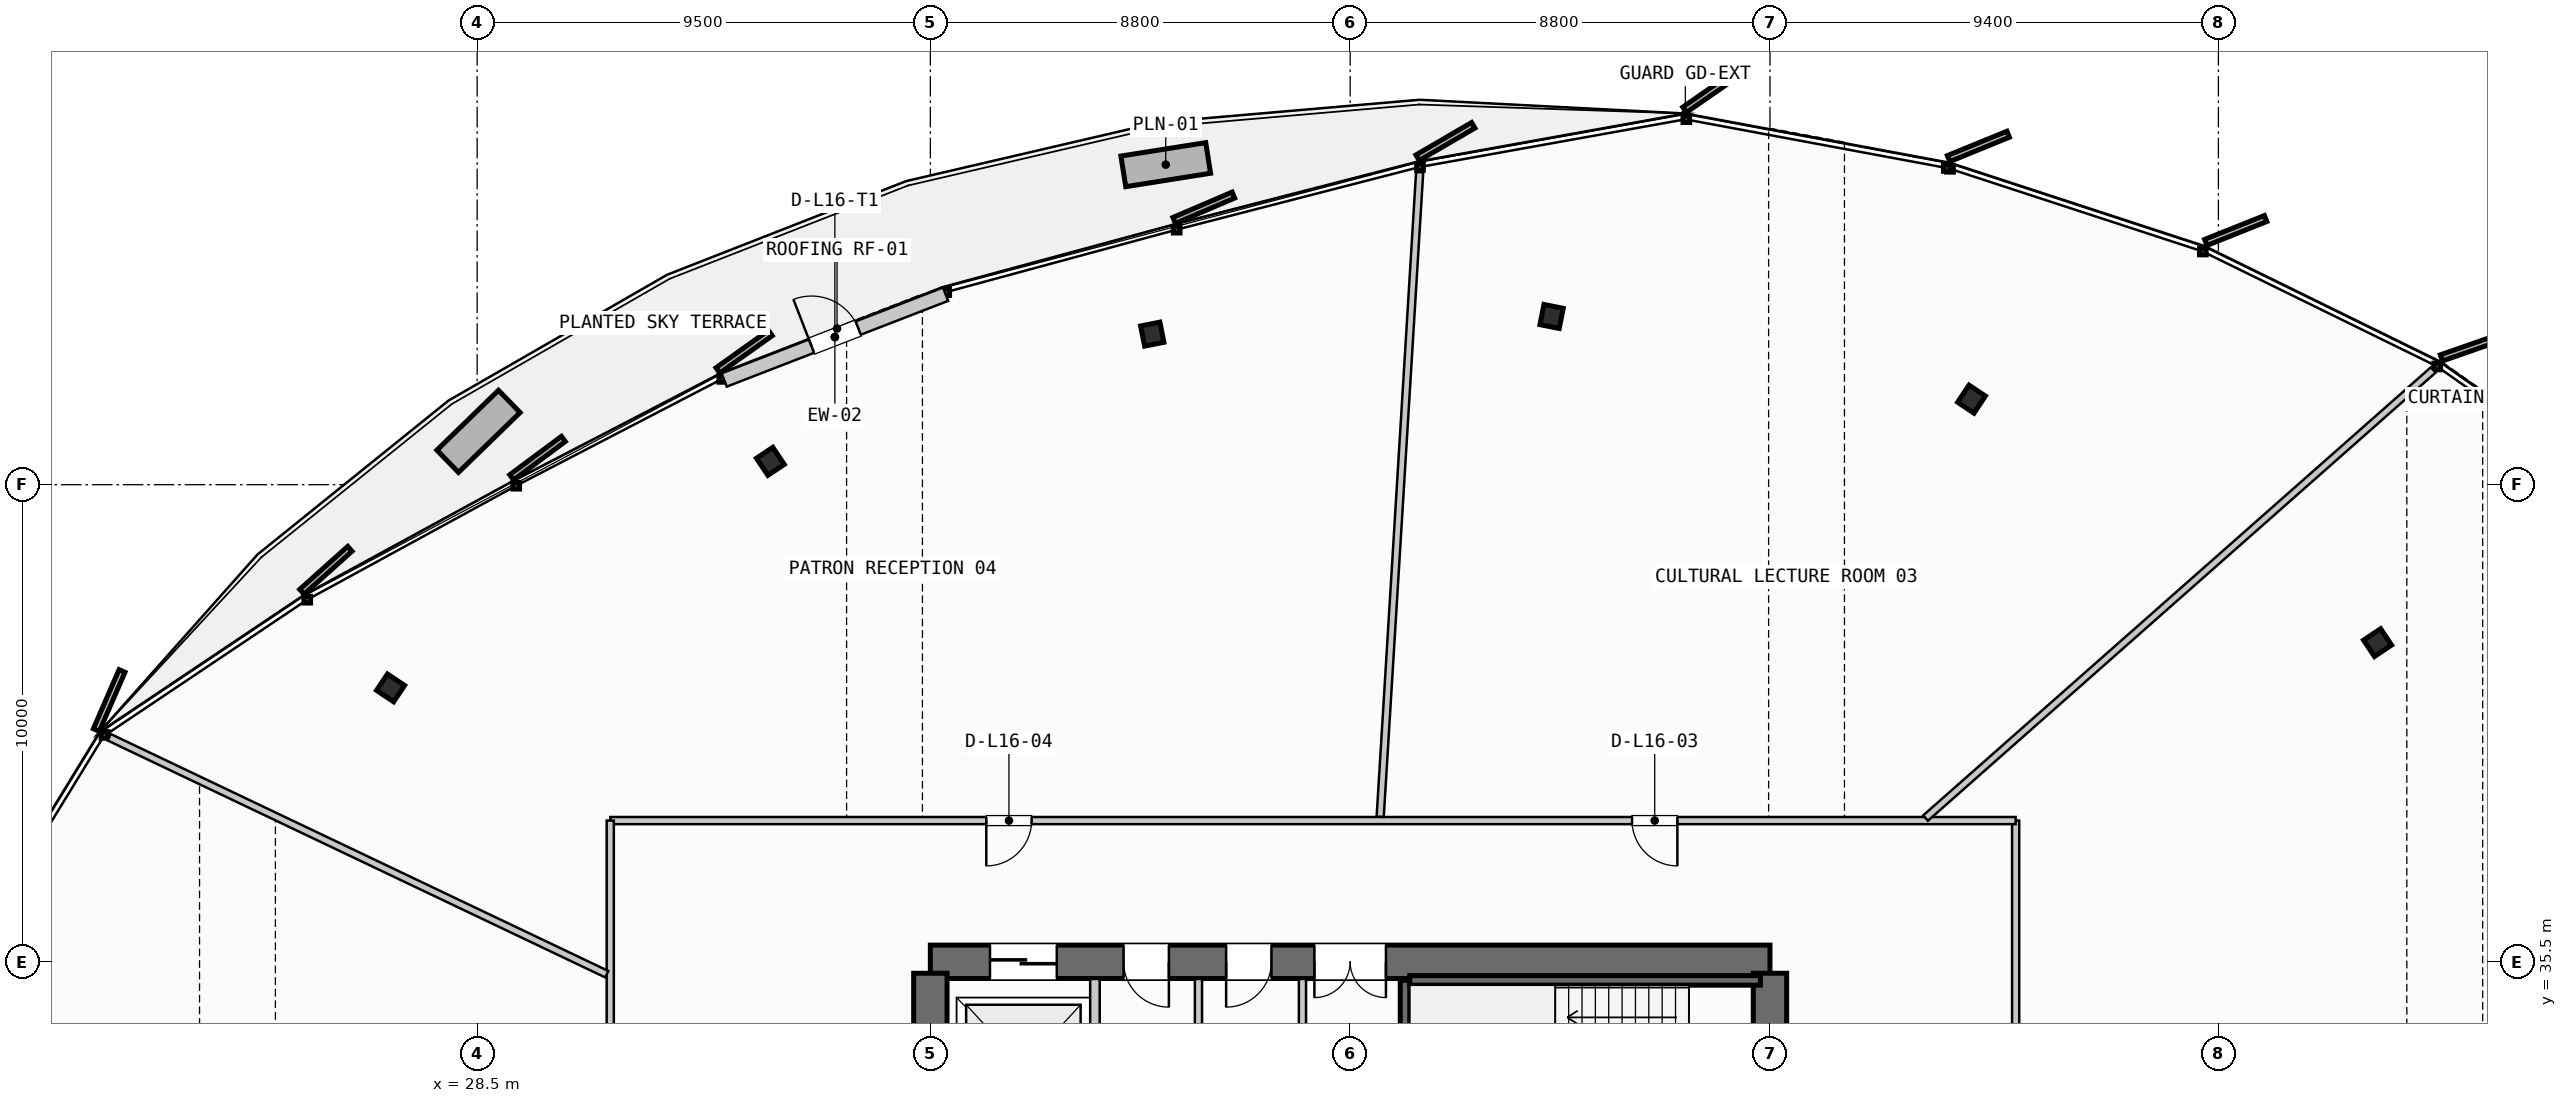
"""IFC4 building model, lengths in metres.
Left out: names, types, materials, properties, quantities, classifications, styles, units other than length and angle.
Written with IfcOpenShell. Run it as: python <this file> out.ifc"""

import sys

from ifc_helpers import new_model, si_unit, direction, frame, frame_2d, origin, origin_2d, place, context, subcontext, project, spatial, rectangle, i_section, extrude, source, transform, mapped, element, fill, save


model = new_model("IFC4")
c1 = context("Model", 3, precision=1e-05, world=origin(), true_north=direction((0.0, 1.0)))
c2 = subcontext(c1, "Body", "Model", "MODEL_VIEW")
j1 = project(units=[si_unit("LENGTHUNIT", "METRE"), si_unit("PLANEANGLEUNIT", "RADIAN")], contexts=[c1])
p1 = place(None, origin())
s1 = spatial("IfcSite", under=j1, at=p1, CompositionType="ELEMENT")
p2 = place(p1, origin())
s2 = spatial("IfcBuilding", under=s1, at=p2, CompositionType="ELEMENT")
p3 = place(p2, frame((0.0, 0.0, 67.6)))
s3 = spatial("IfcBuildingStorey", under=s2, at=p3, CompositionType="ELEMENT", Elevation=67.6)
p4 = place(p3, frame((55.6, 35.5, 0.0), z_axis=(0.0, 0.0, 1.0), x_axis=(-1.0, 0.0, 0.0)))
e1 = element("IfcWall", 1, at=p4, inside=s3, PredefinedType="SHEAR", context=c2, shape_type="SweptSolid", body=[
    extrude(rectangle(XDim=17.6, YDim=0.7, at=frame_2d((8.8, 0.0))), origin(), (0.0, 0.0, 1.0), 3.55),
])
p5 = place(p4, frame((8.05, 0.0, 0.0)))
e2 = element("IfcOpeningElement", 2, at=p5, cuts=e1, PredefinedType="OPENING", context=c2, shape_type="SweptSolid", body=[
    extrude(rectangle(XDim=1.5, YDim=2.2, at=frame_2d((0.75, 1.1))), frame((0.0, 0.36, 0.0), z_axis=(0.0, -1.0, 0.0), x_axis=(1.0, 0.0, 0.0)), (0.0, 0.0, 1.0), 0.72),
])
p6 = place(p4, frame((14.95, 0.0, 0.0)))
e3 = element("IfcOpeningElement", 3, at=p6, cuts=e1, PredefinedType="OPENING", context=c2, shape_type="SweptSolid", body=[
    extrude(rectangle(XDim=1.4, YDim=2.3, at=frame_2d((0.7, 1.15))), frame((0.0, 0.36, 0.0), z_axis=(0.0, -1.0, 0.0), x_axis=(1.0, 0.0, 0.0)), (0.0, 0.0, 1.0), 0.72),
])
p7 = place(p4, frame((12.6, 0.0, 0.0)))
e4 = element("IfcOpeningElement", 4, at=p7, cuts=e1, PredefinedType="OPENING", context=c2, shape_type="SweptSolid", body=[
    extrude(rectangle(XDim=0.95, YDim=2.15, at=frame_2d((0.475, 1.075))), frame((0.0, 0.36, 0.0), z_axis=(0.0, -1.0, 0.0), x_axis=(1.0, 0.0, 0.0)), (0.0, 0.0, 1.0), 0.72),
])
p8 = place(p4, frame((10.45, 0.0, 0.0)))
e5 = element("IfcOpeningElement", 5, at=p8, cuts=e1, PredefinedType="OPENING", context=c2, shape_type="SweptSolid", body=[
    extrude(rectangle(XDim=0.95, YDim=2.15, at=frame_2d((0.475, 1.075))), frame((0.0, 0.36, 0.0), z_axis=(0.0, -1.0, 0.0), x_axis=(1.0, 0.0, 0.0)), (0.0, 0.0, 1.0), 0.72),
])
p9 = place(p3, frame((38.0, 35.26, 0.0), z_axis=(0.0, 0.0, 1.0), x_axis=(0.0, -1.0, 0.0)))
e6 = element("IfcWall", 6, at=p9, inside=s3, PredefinedType="SHEAR", context=c2, shape_type="SweptSolid", body=[
    extrude(rectangle(XDim=14.92, YDim=0.7, at=frame_2d((7.46, 0.0))), origin(), (0.0, 0.0, 1.0), 3.55),
])
p10 = place(p9, frame((5.21, 0.0, 0.0)))
e7 = element("IfcOpeningElement", 7, at=p10, cuts=e6, PredefinedType="OPENING", context=c2, shape_type="SweptSolid", body=[
    extrude(rectangle(XDim=1.1, YDim=2.2, at=frame_2d((0.55, 1.1))), frame((0.0, 0.36, 0.0), z_axis=(0.0, -1.0, 0.0), x_axis=(1.0, 0.0, 0.0)), (0.0, 0.0, 1.0), 0.72),
])
p11 = place(p3, frame((55.6, 20.34, 0.0), z_axis=(0.0, 0.0, 1.0), x_axis=(0.0, 1.0, 0.0)))
e8 = element("IfcWall", 8, at=p11, inside=s3, PredefinedType="SHEAR", context=c2, shape_type="SweptSolid", body=[
    extrude(rectangle(XDim=14.92, YDim=0.7, at=frame_2d((7.46, 0.0))), origin(), (0.0, 0.0, 1.0), 3.55),
])
p12 = place(p11, frame((12.71, 0.0, 0.0)))
e9 = element("IfcOpeningElement", 9, at=p12, cuts=e8, PredefinedType="OPENING", context=c2, shape_type="SweptSolid", body=[
    extrude(rectangle(XDim=1.05, YDim=2.15, at=frame_2d((0.525, 1.075))), frame((0.0, 0.36, 0.0), z_axis=(0.0, -1.0, 0.0), x_axis=(1.0, 0.0, 0.0)), (0.0, 0.0, 1.0), 0.72),
])
p13 = place(p11, frame((8.61, 0.0, 0.0)))
e10 = element("IfcOpeningElement", 10, at=p13, cuts=e8, PredefinedType="OPENING", context=c2, shape_type="SweptSolid", body=[
    extrude(rectangle(XDim=1.1, YDim=2.2, at=frame_2d((0.55, 1.1))), frame((0.0, 0.36, 0.0), z_axis=(0.0, -1.0, 0.0), x_axis=(1.0, 0.0, 0.0)), (0.0, 0.0, 1.0), 0.72),
])
m1 = source(origin(), c2, "Body", "SweptSolid", [
    extrude(i_section(OverallWidth=0.412, OverallDepth=0.431, WebThickness=0.042, FlangeThickness=0.068, FilletRadius=0.015, at=origin_2d()), origin(), (0.0, 0.0, 1.0), 3.55),
])
for number, where, z_axis, x_axis in (
    (11, (68.336, 42.19, 0.0), (0.0, 0.0, 1.0), (0.831, 0.556, 0.0)),
    (12, (59.825, 47.293, 0.0), (0.0, 0.0, 1.0), (0.556, 0.831, 0.0)),
    (13, (51.022, 49.026, 0.0), (0.0, 0.0, 1.0), (0.195, 0.981, 0.0)),
    (14, (42.652, 48.656, 0.0), (0.0, 0.0, 1.0), (-0.195, 0.981, 0.0)),
    (15, (34.646, 45.99, 0.0), (0.0, 0.0, 1.0), (-0.556, 0.831, 0.0)),
    (16, (26.685, 41.241, 0.0), (0.0, 0.0, 1.0), (-0.831, 0.556, 0.0)),
):
    element("IfcColumn", number, at=place(p3, frame(where, z_axis=z_axis, x_axis=x_axis)), inside=s3, PredefinedType="COLUMN", context=c2, shape_type="MappedRepresentation", body=[
        mapped(m1, transform((0.0, 0.0, 0.0), scale=1.0)),
    ])
p14 = place(p3, frame((33.678, 47.695, 0.0), z_axis=(0.0, 0.0, 1.0), x_axis=(0.932484431362, 0.361210167725, 0.0)))
e17 = element("IfcWall", 17, at=p14, inside=s3, PredefinedType="SOLIDWALL", context=c2, shape_type="SweptSolid", body=[
    extrude(rectangle(XDim=4.977, YDim=0.3, at=frame_2d((2.488, 0.0))), origin(), (0.0, 0.0, 1.0), 2.925),
])
p15 = place(p14, frame((1.963, 0.0, 0.0)))
e18 = element("IfcOpeningElement", 18, at=p15, cuts=e17, PredefinedType="OPENING", context=c2, shape_type="SweptSolid", body=[
    extrude(rectangle(XDim=1.05, YDim=2.2, at=frame_2d((0.525, 1.1))), frame((0.0, 0.16, 0.0), z_axis=(0.0, -1.0, 0.0), x_axis=(1.0, 0.0, 0.0)), (0.0, 0.0, 1.0), 0.32),
])
p16 = place(p3, frame((47.95, 32.05, 0.0), z_axis=(0.0, 0.0, 1.0), x_axis=(0.0, 1.0, 0.0)))
e19 = element("IfcWall", 19, at=p16, inside=s3, PredefinedType="SHEAR", context=c2, shape_type="SweptSolid", body=[
    extrude(rectangle(XDim=3.06, YDim=0.2, at=frame_2d((1.53, 0.0))), origin(), (0.0, 0.0, 1.0), 3.55),
])
p17 = place(p3, frame((48.05, 35.11, 0.0), z_axis=(0.0, 0.0, 1.0), x_axis=(1.0, 0.0, 0.0)))
e20 = element("IfcWall", 20, at=p17, inside=s3, PredefinedType="SHEAR", context=c2, shape_type="SweptSolid", body=[
    extrude(rectangle(XDim=7.35, YDim=0.2, at=frame_2d((3.675, 0.0))), origin(), (0.0, 0.0, 1.0), 3.55),
])
p18 = place(p3, frame((41.45, 31.85, 0.0), z_axis=(0.0, 0.0, 1.0), x_axis=(0.0, 1.0, 0.0)))
e21 = element("IfcWall", 21, at=p18, inside=s3, PredefinedType="PARTITIONING", context=c2, shape_type="SweptSolid", body=[
    extrude(rectangle(XDim=3.29, YDim=0.2, at=frame_2d((1.645, 0.0))), origin(), (0.0, 0.0, 1.0), 2.505),
])
p19 = place(p3, frame((45.8, 31.85, 0.0), z_axis=(0.0, 0.0, 1.0), x_axis=(0.0, 1.0, 0.0)))
e22 = element("IfcWall", 22, at=p19, inside=s3, PredefinedType="PARTITIONING", context=c2, shape_type="SweptSolid", body=[
    extrude(rectangle(XDim=3.29, YDim=0.15, at=frame_2d((1.645, 0.0))), origin(), (0.0, 0.0, 1.0), 2.505),
])
p20 = place(p3, frame((43.62, 31.85, 0.0), z_axis=(0.0, 0.0, 1.0), x_axis=(0.0, 1.0, 0.0)))
e23 = element("IfcWall", 23, at=p20, inside=s3, PredefinedType="PLUMBINGWALL", context=c2, shape_type="SweptSolid", body=[
    extrude(rectangle(XDim=3.29, YDim=0.15, at=frame_2d((1.645, 0.0))), origin(), (0.0, 0.0, 1.0), 2.505),
])
p21 = place(p3, frame((60.75, 17.14, 0.0), z_axis=(0.0, 0.0, 1.0), x_axis=(0.0, 1.0, 0.0)))
e24 = element("IfcWall", 24, at=p21, inside=s3, PredefinedType="PARTITIONING", context=c2, shape_type="SweptSolid", body=[
    extrude(rectangle(XDim=21.32, YDim=0.15, at=frame_2d((10.66, 0.0))), origin(), (0.0, 0.0, 1.0), 2.505),
])
p22 = place(p21, frame((10.185, 0.0, 0.0)))
e25 = element("IfcOpeningElement", 25, at=p22, cuts=e24, PredefinedType="OPENING", context=c2, shape_type="SweptSolid", body=[
    extrude(rectangle(XDim=0.95, YDim=2.15, at=frame_2d((0.475, 1.075))), frame((0.0, 0.085, 0.0), z_axis=(0.0, -1.0, 0.0), x_axis=(1.0, 0.0, 0.0)), (0.0, 0.0, 1.0), 0.17),
])
p23 = place(p3, frame((60.75, 38.46, 0.0), z_axis=(0.0, 0.0, 1.0), x_axis=(-1.0, 0.0, 0.0)))
e26 = element("IfcWall", 26, at=p23, inside=s3, PredefinedType="PARTITIONING", context=c2, shape_type="SweptSolid", body=[
    extrude(rectangle(XDim=29.46, YDim=0.15, at=frame_2d((14.73, 0.0))), origin(), (0.0, 0.0, 1.0), 2.505),
])
p24 = place(p23, frame((7.091, 0.0, 0.0)))
e27 = element("IfcOpeningElement", 27, at=p24, cuts=e26, PredefinedType="OPENING", context=c2, shape_type="SweptSolid", body=[
    extrude(rectangle(XDim=0.95, YDim=2.15, at=frame_2d((0.475, 1.075))), frame((0.0, 0.085, 0.0), z_axis=(0.0, -1.0, 0.0), x_axis=(1.0, 0.0, 0.0)), (0.0, 0.0, 1.0), 0.17),
])
p25 = place(p23, frame((20.628, 0.0, 0.0)))
e28 = element("IfcOpeningElement", 28, at=p25, cuts=e26, PredefinedType="OPENING", context=c2, shape_type="SweptSolid", body=[
    extrude(rectangle(XDim=0.95, YDim=2.15, at=frame_2d((0.475, 1.075))), frame((0.0, 0.085, 0.0), z_axis=(0.0, -1.0, 0.0), x_axis=(1.0, 0.0, 0.0)), (0.0, 0.0, 1.0), 0.17),
])
p26 = place(p3, frame((31.29, 38.46, 0.0), z_axis=(0.0, 0.0, 1.0), x_axis=(0.0, -1.0, 0.0)))
e29 = element("IfcWall", 29, at=p26, inside=s3, PredefinedType="PARTITIONING", context=c2, shape_type="SweptSolid", body=[
    extrude(rectangle(XDim=21.32, YDim=0.15, at=frame_2d((10.66, 0.0))), origin(), (0.0, 0.0, 1.0), 2.505),
])
p27 = place(p26, frame((10.2, 0.0, 0.0)))
e30 = element("IfcOpeningElement", 30, at=p27, cuts=e29, PredefinedType="OPENING", context=c2, shape_type="SweptSolid", body=[
    extrude(rectangle(XDim=0.95, YDim=2.15, at=frame_2d((0.475, 1.075))), frame((0.0, 0.085, 0.0), z_axis=(0.0, -1.0, 0.0), x_axis=(1.0, 0.0, 0.0)), (0.0, 0.0, 1.0), 0.17),
])
p28 = place(p3, frame((58.862, 38.513, 0.0), z_axis=(0.0, 0.0, 1.0), x_axis=(0.749751511965, 0.661719480071, 0.0)))
e31 = element("IfcWall", 31, at=p28, inside=s3, PredefinedType="PARTITIONING", context=c2, shape_type="SweptSolid", body=[
    extrude(rectangle(XDim=14.194, YDim=0.15, at=frame_2d((7.097, 0.0))), origin(), (0.0, 0.0, 1.0), 2.505),
])
p29 = place(p3, frame((47.429, 38.54, 0.0), z_axis=(0.0, 0.0, 1.0), x_axis=(0.061146369808, 0.998128810054, 0.0)))
e32 = element("IfcWall", 32, at=p29, inside=s3, PredefinedType="PARTITIONING", context=c2, shape_type="SweptSolid", body=[
    extrude(rectangle(XDim=13.535, YDim=0.15, at=frame_2d((6.768, 0.0))), origin(), (0.0, 0.0, 1.0), 2.505),
])
p30 = place(p3, frame((31.218, 35.24, 0.0), z_axis=(0.0, 0.0, 1.0), x_axis=(-0.90287106559, 0.429911431484, 0.0)))
e33 = element("IfcWall", 33, at=p30, inside=s3, PredefinedType="PARTITIONING", context=c2, shape_type="SweptSolid", body=[
    extrude(rectangle(XDim=11.552, YDim=0.15, at=frame_2d((5.776, 0.0))), origin(), (0.0, 0.0, 1.0), 2.505),
])
m2 = source(origin(), c2, "Body", "SweptSolid", [
    extrude(rectangle(XDim=1.05, YDim=2.2, at=frame_2d((0.525, 1.1))), frame((0.0, 0.025, 0.0), z_axis=(0.0, -1.0, 0.0), x_axis=(1.0, 0.0, 0.0)), (0.0, 0.0, 1.0), 0.05),
])
p31 = place(p15, origin())
e34 = element("IfcDoor", 34, at=p31, inside=s3, OperationType="SINGLE_SWING_LEFT", PredefinedType="DOOR", context=c2, shape_type="MappedRepresentation", body=[
    mapped(m2, transform((0.0, 0.0, 0.0), scale=1.0)),
])
fill(e18, e34)
m3 = source(origin(), c2, "Body", "SweptSolid", [
    extrude(rectangle(XDim=1.5, YDim=2.2, at=frame_2d((0.75, 1.1))), frame((0.0, 0.025, 0.0), z_axis=(0.0, -1.0, 0.0), x_axis=(1.0, 0.0, 0.0)), (0.0, 0.0, 1.0), 0.05),
])
p32 = place(p5, origin())
e35 = element("IfcDoor", 35, at=p32, inside=s3, OperationType="DOUBLE_DOOR_SINGLE_SWING", PredefinedType="DOOR", context=c2, shape_type="MappedRepresentation", body=[
    mapped(m3, transform((0.0, 0.0, 0.0), scale=1.0)),
])
fill(e2, e35)
m4 = source(origin(), c2, "Body", "SweptSolid", [
    extrude(rectangle(XDim=1.4, YDim=2.3, at=frame_2d((0.7, 1.15))), frame((0.0, 0.025, 0.0), z_axis=(0.0, -1.0, 0.0), x_axis=(1.0, 0.0, 0.0)), (0.0, 0.0, 1.0), 0.05),
])
p33 = place(p6, origin())
e36 = element("IfcDoor", 36, at=p33, inside=s3, OperationType="SLIDING_TO_RIGHT", PredefinedType="DOOR", context=c2, shape_type="MappedRepresentation", body=[
    mapped(m4, transform((0.0, 0.0, 0.0), scale=1.0)),
])
fill(e3, e36)
m5 = source(origin(), c2, "Body", "SweptSolid", [
    extrude(rectangle(XDim=0.95, YDim=2.15, at=frame_2d((0.475, 1.075))), frame((0.0, 0.025, 0.0), z_axis=(0.0, -1.0, 0.0), x_axis=(1.0, 0.0, 0.0)), (0.0, 0.0, 1.0), 0.05),
])
p34 = place(p7, origin())
e37 = element("IfcDoor", 37, at=p34, inside=s3, OperationType="SINGLE_SWING_LEFT", PredefinedType="DOOR", context=c2, shape_type="MappedRepresentation", body=[
    mapped(m5, transform((0.0, 0.0, 0.0), scale=1.0)),
])
fill(e4, e37)
p35 = place(p8, origin())
e38 = element("IfcDoor", 38, at=p35, inside=s3, OperationType="SINGLE_SWING_RIGHT", PredefinedType="DOOR", context=c2, shape_type="MappedRepresentation", body=[
    mapped(m5, transform((0.0, 0.0, 0.0), scale=1.0)),
])
fill(e5, e38)
p36 = place(p24, origin())
e39 = element("IfcDoor", 39, at=p36, inside=s3, OperationType="SINGLE_SWING_LEFT", PredefinedType="DOOR", context=c2, shape_type="MappedRepresentation", body=[
    mapped(m5, transform((0.0, 0.0, 0.0), scale=1.0)),
])
fill(e27, e39)
p37 = place(p25, origin())
e40 = element("IfcDoor", 40, at=p37, inside=s3, OperationType="SINGLE_SWING_RIGHT", PredefinedType="DOOR", context=c2, shape_type="MappedRepresentation", body=[
    mapped(m5, transform((0.0, 0.0, 0.0), scale=1.0)),
])
fill(e28, e40)
save(model, sys.argv[1])
